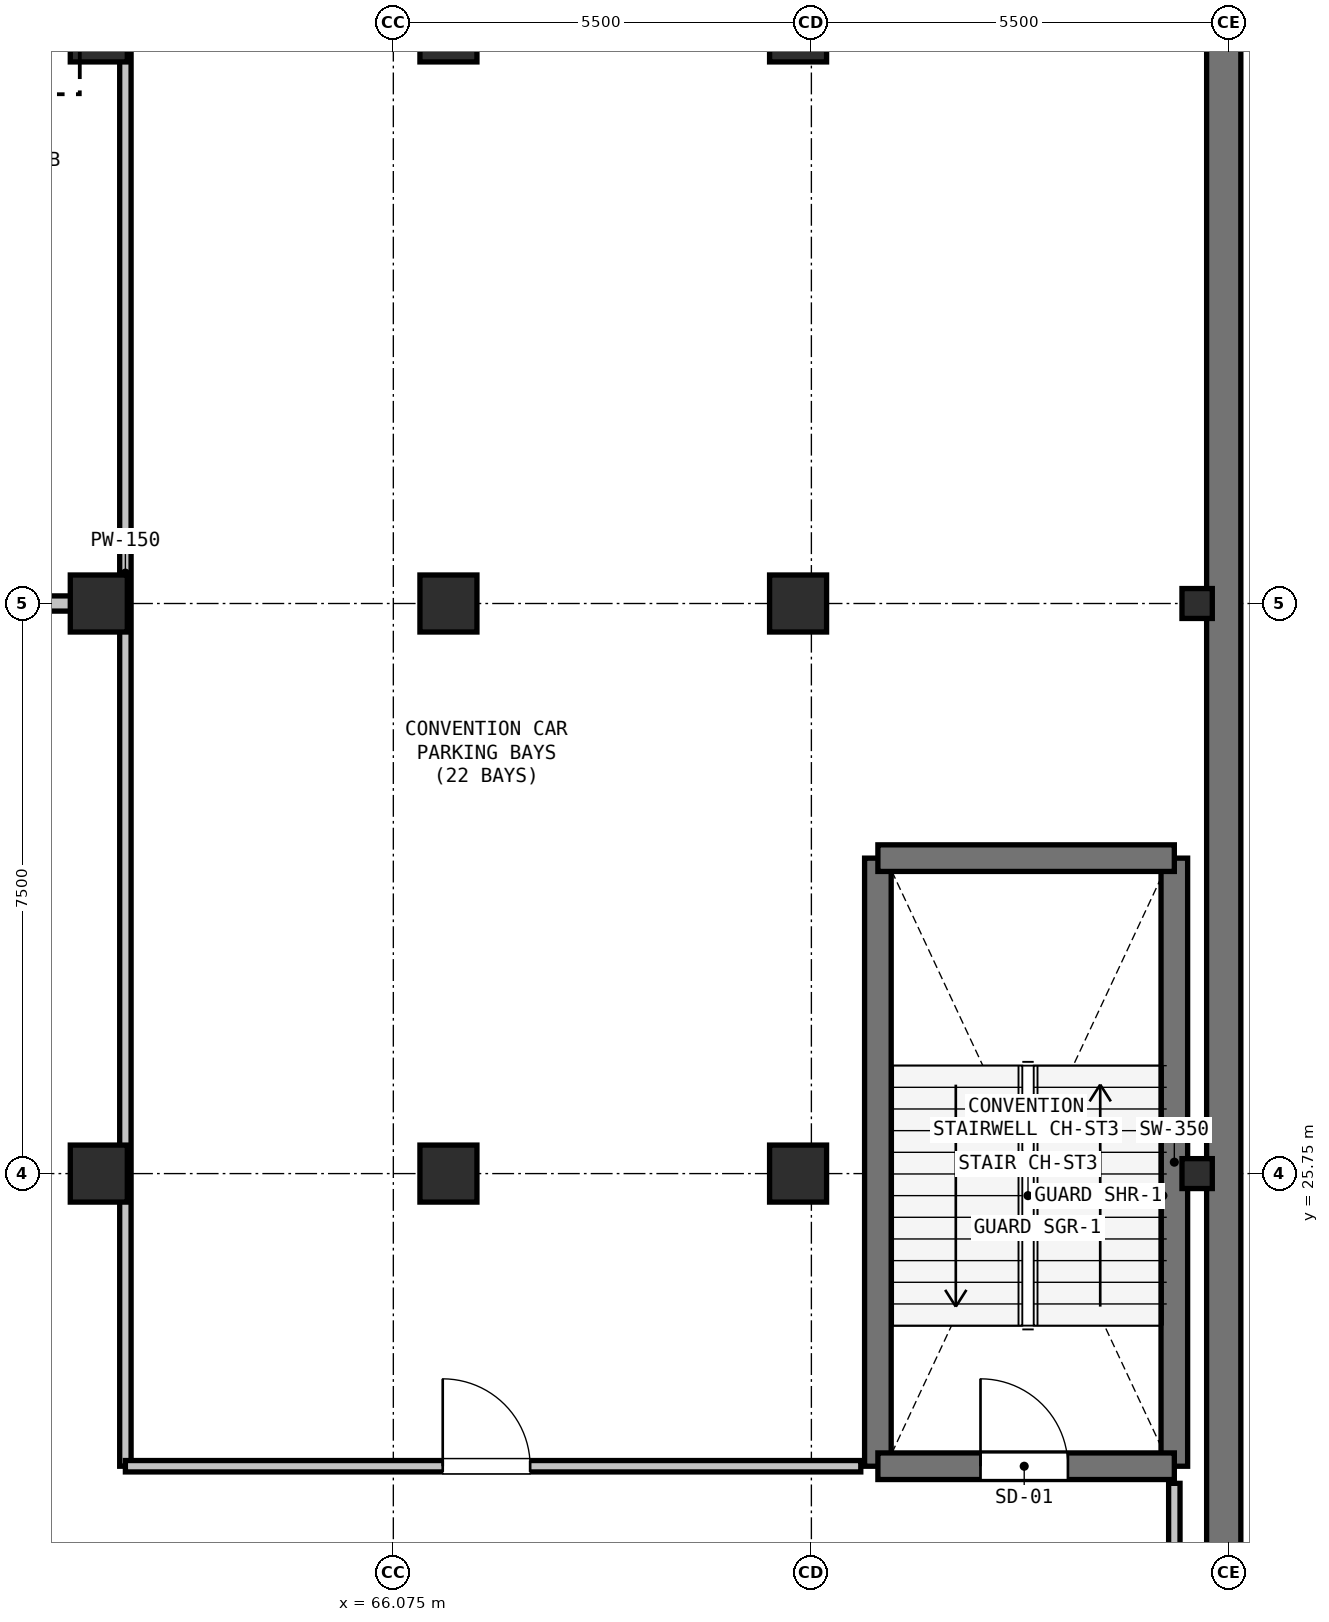
"""IFC4 building model, lengths in metres.
Left out: names, types, materials, properties, quantities, classifications, styles, units other than length and angle.
Written with IfcOpenShell. Run it as: python <this file> out.ifc"""

import sys

from ifc_helpers import new_model, si_unit, direction, frame, frame_2d, origin, origin_2d, place, context, subcontext, project, spatial, rectangle, i_section, extrude, element, fill, save


model = new_model("IFC4")
c1 = context("Model", 3, precision=1e-05, world=origin(), true_north=direction((0.0, 1.0)))
c2 = subcontext(c1, "Body", "Model", "MODEL_VIEW")
j1 = project(units=[si_unit("LENGTHUNIT", "METRE"), si_unit("PLANEANGLEUNIT", "RADIAN")], contexts=[c1])
p1 = place(None, origin())
s1 = spatial("IfcSite", under=j1, at=p1, CompositionType="ELEMENT")
p2 = place(p1, origin())
s2 = spatial("IfcBuilding", under=s1, at=p2, CompositionType="ELEMENT")
p3 = place(p2, frame((0.0, 0.0, -4.5)))
s3 = spatial("IfcBuildingStorey", under=s2, at=p3, CompositionType="ELEMENT", Elevation=-4.5)
p4 = place(p3, frame((77.0, 2.5, 0.0), z_axis=(0.0, 0.0, 1.0), x_axis=(0.0, 1.0, 0.0)))
e1 = element("IfcWall", 1, at=p4, inside=s3, PredefinedType="USERDEFINED", context=c2, shape_type="SweptSolid", body=[
    extrude(rectangle(XDim=48.5, YDim=0.45, at=frame_2d((24.25, 0.0))), origin(), (0.0, 0.0, 1.0), 4.5),
])
for number, where, z_axis, x_axis in (
    (2, (76.65, 25.75, 0.0), (0.0, 0.0, 1.0), (1.0, 0.0, 0.0)),
    (3, (76.65, 33.25, 0.0), (0.0, 0.0, 1.0), (1.0, 0.0, 0.0)),
):
    element("IfcColumn", number, at=place(p3, frame(where, z_axis=z_axis, x_axis=x_axis)), inside=s3, PredefinedType="COLUMN", context=c2, shape_type="SweptSolid", body=[
        extrude(i_section(OverallWidth=0.399, OverallDepth=0.394, WebThickness=0.023, FlangeThickness=0.037, at=origin_2d()), origin(), (0.0, 0.0, 1.0), 4.5),
    ])
for number, where, z_axis, x_axis in (
    (4, (62.2, 25.75, 0.0), (0.0, 0.0, 1.0), (1.0, 0.0, 0.0)),
    (5, (62.2, 33.25, 0.0), (0.0, 0.0, 1.0), (1.0, 0.0, 0.0)),
    (6, (62.2, 40.75, 0.0), (0.0, 0.0, 1.0), (1.0, 0.0, 0.0)),
    (7, (66.8, 25.75, 0.0), (0.0, 0.0, 1.0), (1.0, 0.0, 0.0)),
    (8, (66.8, 33.25, 0.0), (0.0, 0.0, 1.0), (1.0, 0.0, 0.0)),
    (9, (66.8, 40.75, 0.0), (0.0, 0.0, 1.0), (1.0, 0.0, 0.0)),
    (10, (71.4, 25.75, 0.0), (0.0, 0.0, 1.0), (1.0, 0.0, 0.0)),
    (11, (71.4, 33.25, 0.0), (0.0, 0.0, 1.0), (1.0, 0.0, 0.0)),
    (12, (71.4, 40.75, 0.0), (0.0, 0.0, 1.0), (1.0, 0.0, 0.0)),
):
    element("IfcColumn", number, at=place(p3, frame(where, z_axis=z_axis, x_axis=x_axis)), inside=s3, PredefinedType="COLUMN", context=c2, shape_type="SweptSolid", body=[
        extrude(rectangle(XDim=0.75, YDim=0.75, at=origin_2d()), origin(), (0.0, 0.0, 1.0), 4.5),
    ])
for number, where, z_axis, x_axis in (
    (13, (76.35, 29.9, 0.0), (0.0, 0.0, 1.0), (0.0, -1.0, 0.0)),
    (14, (72.45, 21.9, 0.0), (0.0, 0.0, 1.0), (0.0, 1.0, 0.0)),
):
    element("IfcWall", number, at=place(p3, frame(where, z_axis=z_axis, x_axis=x_axis)), inside=s3, PredefinedType="SHEAR", context=c2, shape_type="SweptSolid", body=[
        extrude(rectangle(XDim=8.0, YDim=0.35, at=frame_2d((4.0, 0.0))), origin(), (0.0, 0.0, 1.0), 4.2),
    ])
p5 = place(p3, frame((72.45, 29.9, 0.0), z_axis=(0.0, 0.0, 1.0), x_axis=(1.0, 0.0, 0.0)))
e15 = element("IfcWall", 15, at=p5, inside=s3, PredefinedType="SHEAR", context=c2, shape_type="SweptSolid", body=[
    extrude(rectangle(XDim=3.9, YDim=0.35, at=frame_2d((1.95, 0.0))), origin(), (0.0, 0.0, 1.0), 4.2),
])
p6 = place(p3, frame((72.45, 21.9, 0.0), z_axis=(0.0, 0.0, 1.0), x_axis=(1.0, 0.0, 0.0)))
e16 = element("IfcWall", 16, at=p6, inside=s3, PredefinedType="SHEAR", context=c2, shape_type="SweptSolid", body=[
    extrude(rectangle(XDim=3.9, YDim=0.35, at=frame_2d((1.95, 0.0))), origin(), (0.0, 0.0, 1.0), 4.2),
])
p7 = place(p6, frame((1.35, 0.0, 0.0)))
e17 = element("IfcOpeningElement", 17, at=p7, cuts=e16, PredefinedType="OPENING", context=c2, shape_type="SweptSolid", body=[
    extrude(rectangle(XDim=1.15, YDim=2.15, at=frame_2d((0.575, 1.075))), frame((0.0, 0.185, 0.0), z_axis=(0.0, -1.0, 0.0), x_axis=(1.0, 0.0, 0.0)), (0.0, 0.0, 1.0), 0.37),
])
p8 = place(p3, frame((55.5, 33.25, 0.0), z_axis=(0.0, 0.0, 1.0), x_axis=(1.0, 0.0, 0.0)))
e18 = element("IfcWall", 18, at=p8, inside=s3, PredefinedType="PARTITIONING", context=c2, shape_type="SweptSolid", body=[
    extrude(rectangle(XDim=6.7, YDim=0.2, at=frame_2d((3.35, 0.0))), origin(), (0.0, 0.0, 1.0), 4.2),
])
p9 = place(p8, frame((1.25, 0.0, 0.0)))
e19 = element("IfcOpeningElement", 19, at=p9, cuts=e18, PredefinedType="OPENING", context=c2, shape_type="SweptSolid", body=[
    extrude(rectangle(XDim=3.6, YDim=2.8, at=frame_2d((1.8, 1.4))), frame((0.0, 0.11, 0.0), z_axis=(0.0, -1.0, 0.0), x_axis=(1.0, 0.0, 0.0)), (0.0, 0.0, 1.0), 0.22),
])
p10 = place(p3, frame((62.55, 45.4, 0.0), z_axis=(0.0, 0.0, 1.0), x_axis=(0.0, -1.0, 0.0)))
e20 = element("IfcWall", 20, at=p10, inside=s3, PredefinedType="PARTITIONING", context=c2, shape_type="SweptSolid", body=[
    extrude(rectangle(XDim=23.5, YDim=0.15, at=frame_2d((11.75, 0.0))), origin(), (0.0, 0.0, 1.0), 4.2),
])
p11 = place(p3, frame((62.55, 21.9, 0.0), z_axis=(0.0, 0.0, 1.0), x_axis=(1.0, 0.0, 0.0)))
e21 = element("IfcWall", 21, at=p11, inside=s3, PredefinedType="PARTITIONING", context=c2, shape_type="SweptSolid", body=[
    extrude(rectangle(XDim=9.675, YDim=0.15, at=frame_2d((4.837, 0.0))), origin(), (0.0, 0.0, 1.0), 4.2),
])
p12 = place(p11, frame((4.175, 0.0, 0.0)))
e22 = element("IfcOpeningElement", 22, at=p12, cuts=e21, PredefinedType="OPENING", context=c2, shape_type="SweptSolid", body=[
    extrude(rectangle(XDim=1.15, YDim=2.15, at=frame_2d((0.575, 1.075))), frame((0.0, 0.085, 0.0), z_axis=(0.0, -1.0, 0.0), x_axis=(1.0, 0.0, 0.0)), (0.0, 0.0, 1.0), 0.17),
])
p13 = place(p3, frame((76.35, 21.675, 0.0), z_axis=(0.0, 0.0, 1.0), x_axis=(0.0, -1.0, 0.0)))
e23 = element("IfcWall", 23, at=p13, inside=s3, PredefinedType="PARTITIONING", context=c2, shape_type="SweptSolid", body=[
    extrude(rectangle(XDim=2.175, YDim=0.15, at=frame_2d((1.087, 0.0))), origin(), (0.0, 0.0, 1.0), 4.2),
])
p14 = place(p7, origin())
e24 = element("IfcDoor", 24, at=p14, inside=s3, OperationType="SINGLE_SWING_LEFT", PredefinedType="DOOR", context=c2, shape_type="SweptSolid", body=[
    extrude(rectangle(XDim=1.15, YDim=2.15, at=frame_2d((0.575, 1.075))), frame((0.0, 0.025, 0.0), z_axis=(0.0, -1.0, 0.0), x_axis=(1.0, 0.0, 0.0)), (0.0, 0.0, 1.0), 0.05),
])
fill(e17, e24)
p15 = place(p12, origin())
e25 = element("IfcDoor", 25, at=p15, inside=s3, OperationType="SINGLE_SWING_LEFT", PredefinedType="DOOR", context=c2, shape_type="SweptSolid", body=[
    extrude(rectangle(XDim=1.15, YDim=2.15, at=frame_2d((0.575, 1.075))), frame((0.0, 0.025, 0.0), z_axis=(0.0, -1.0, 0.0), x_axis=(1.0, 0.0, 0.0)), (0.0, 0.0, 1.0), 0.05),
])
fill(e22, e25)
save(model, sys.argv[1])
